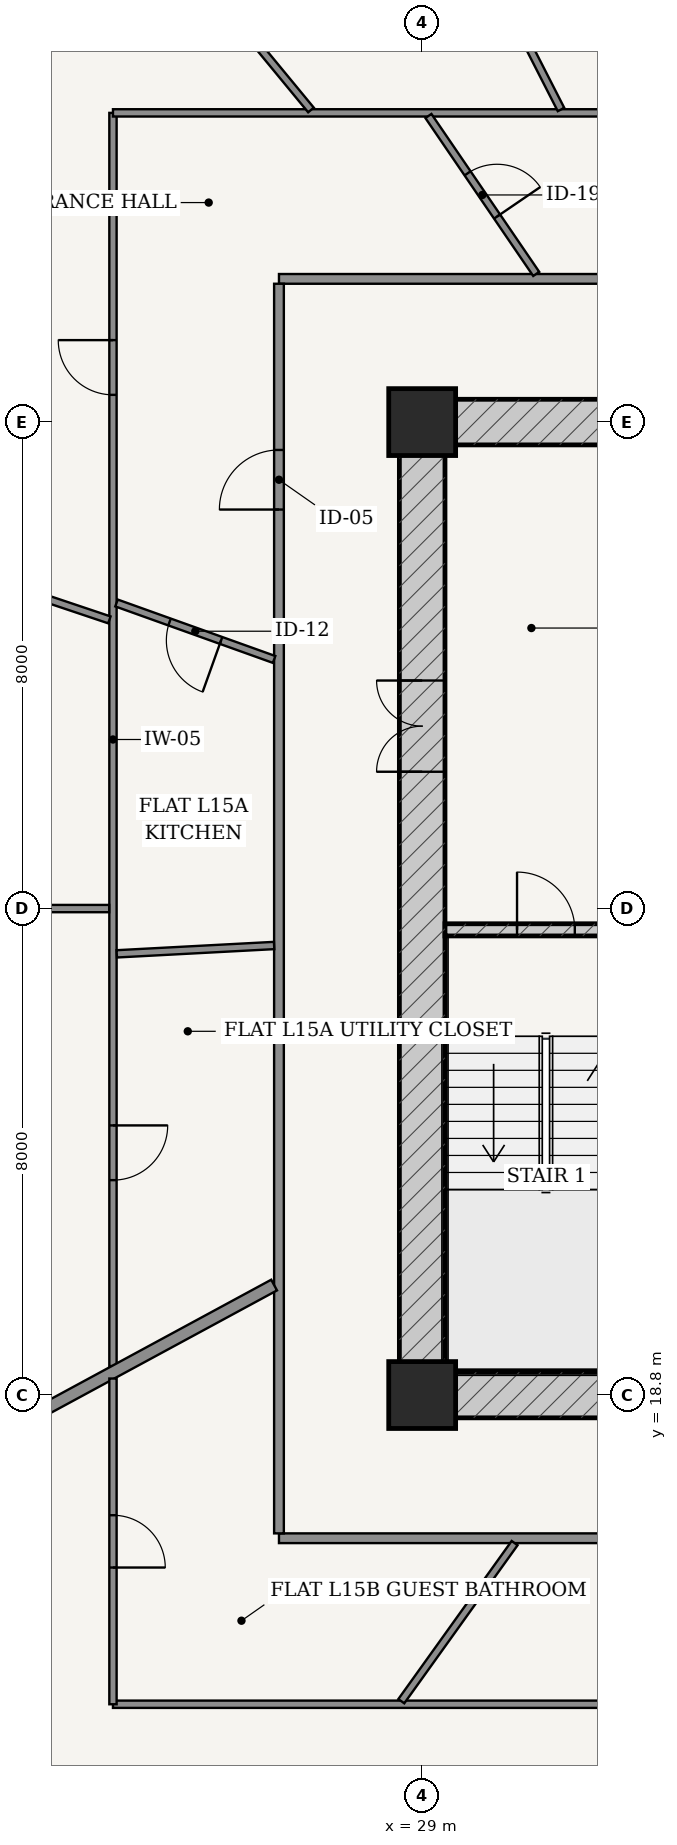
"""IFC4 building model, lengths in metres.
Left out: names, types, materials, properties, quantities, classifications, styles, units other than length and angle.
Written with IfcOpenShell. Run it as: python <this file> out.ifc"""

import sys

from ifc_helpers import new_model, si_unit, direction, frame, frame_2d, origin, origin_2d, place, context, subcontext, project, spatial, rectangle, extrude, source, transform, mapped, element, fill, save


model = new_model("IFC4")
c1 = context("Model", 3, precision=1e-05, world=origin(), true_north=direction((-0.2419218956, 0.970295726276)))
c2 = subcontext(c1, "Body", "Model", "MODEL_VIEW")
j1 = project(units=[si_unit("LENGTHUNIT", "METRE"), si_unit("PLANEANGLEUNIT", "RADIAN")], contexts=[c1])
p1 = place(None, origin())
s1 = spatial("IfcSite", under=j1, at=p1, CompositionType="ELEMENT")
p2 = place(p1, origin())
s2 = spatial("IfcBuilding", under=s1, at=p2, CompositionType="ELEMENT")
p3 = place(p2, frame((0.0, 0.0, 60.0)))
s3 = spatial("IfcBuildingStorey", under=s2, at=p3, CompositionType="ELEMENT", Elevation=60.0)
for number, where, z_axis, x_axis in (
    (1, (29.0, 18.8, 0.0), (0.0, 0.0, 1.0), (1.0, 0.0, 0.0)),
    (2, (29.0, 34.8, 0.0), (0.0, 0.0, 1.0), (1.0, 0.0, 0.0)),
):
    element("IfcColumn", number, at=place(p3, frame(where, z_axis=z_axis, x_axis=x_axis)), inside=s3, PredefinedType="COLUMN", context=c2, shape_type="SweptSolid", body=[
        extrude(rectangle(XDim=1.1, YDim=1.1, at=origin_2d()), origin(), (0.0, 0.0, 1.0), 3.6),
    ])
p4 = place(p3, frame((28.625, 18.8, 0.0), z_axis=(0.0, 0.0, 1.0), x_axis=(1.0, 0.0, 0.0)))
e3 = element("IfcWall", 3, at=p4, inside=s3, PredefinedType="SHEAR", context=c2, shape_type="SweptSolid", body=[
    extrude(rectangle(XDim=18.75, YDim=0.75, at=frame_2d((9.375, 0.0))), origin(), (0.0, 0.0, 1.0), 3.32),
])
p5 = place(p4, frame((8.95, 0.0, 0.0)))
e4 = element("IfcOpeningElement", 4, at=p5, cuts=e3, PredefinedType="OPENING", context=c2, shape_type="SweptSolid", body=[
    extrude(rectangle(XDim=0.85, YDim=2.1, at=frame_2d((0.425, 1.05))), frame((0.0, 0.385, 0.0), z_axis=(0.0, -1.0, 0.0), x_axis=(1.0, 0.0, 0.0)), (0.0, 0.0, 1.0), 0.77),
])
p6 = place(p3, frame((28.625, 34.8, 0.0), z_axis=(0.0, 0.0, 1.0), x_axis=(1.0, 0.0, 0.0)))
e5 = element("IfcWall", 5, at=p6, inside=s3, PredefinedType="SHEAR", context=c2, shape_type="SweptSolid", body=[
    extrude(rectangle(XDim=18.75, YDim=0.75, at=frame_2d((9.375, 0.0))), origin(), (0.0, 0.0, 1.0), 3.32),
])
p7 = place(p6, frame((8.95, 0.0, 0.0)))
e6 = element("IfcOpeningElement", 6, at=p7, cuts=e5, PredefinedType="OPENING", context=c2, shape_type="SweptSolid", body=[
    extrude(rectangle(XDim=0.85, YDim=2.1, at=frame_2d((0.425, 1.05))), frame((0.0, 0.385, 0.0), z_axis=(0.0, -1.0, 0.0), x_axis=(1.0, 0.0, 0.0)), (0.0, 0.0, 1.0), 0.77),
])
p8 = place(p3, frame((29.0, 19.175, 0.0), z_axis=(0.0, 0.0, 1.0), x_axis=(0.0, 1.0, 0.0)))
e7 = element("IfcWall", 7, at=p8, inside=s3, PredefinedType="SHEAR", context=c2, shape_type="SweptSolid", body=[
    extrude(rectangle(XDim=15.25, YDim=0.75, at=frame_2d((7.625, 0.0))), origin(), (0.0, 0.0, 1.0), 3.32),
])
p9 = place(p8, frame((9.875, 0.0, 0.0)))
e8 = element("IfcOpeningElement", 8, at=p9, cuts=e7, PredefinedType="OPENING", context=c2, shape_type="SweptSolid", body=[
    extrude(rectangle(XDim=1.5, YDim=2.2, at=frame_2d((0.75, 1.1))), frame((0.0, 0.385, 0.0), z_axis=(0.0, -1.0, 0.0), x_axis=(1.0, 0.0, 0.0)), (0.0, 0.0, 1.0), 0.77),
])
p10 = place(p3, frame((29.375, 26.45, 0.0), z_axis=(0.0, 0.0, 1.0), x_axis=(1.0, 0.0, 0.0)))
e9 = element("IfcWall", 9, at=p10, inside=s3, PredefinedType="SOLIDWALL", context=c2, shape_type="SweptSolid", body=[
    extrude(rectangle(XDim=3.32, YDim=0.2, at=frame_2d((1.66, 0.0))), origin(), (0.0, 0.0, 1.0), 3.32),
])
p11 = place(p10, frame((1.185, 0.0, 0.0)))
e10 = element("IfcOpeningElement", 10, at=p11, cuts=e9, PredefinedType="OPENING", context=c2, shape_type="SweptSolid", body=[
    extrude(rectangle(XDim=0.95, YDim=2.15, at=frame_2d((0.475, 1.075))), frame((0.0, 0.11, 0.0), z_axis=(0.0, -1.0, 0.0), x_axis=(1.0, 0.0, 0.0)), (0.0, 0.0, 1.0), 0.22),
])
for number, where, z_axis, x_axis in (
    (11, (26.645, 16.445, 0.0), (0.0, 0.0, 1.0), (1.0, 0.0, 0.0)),
    (12, (26.645, 37.155, 0.0), (0.0, 0.0, 1.0), (1.0, 0.0, 0.0)),
):
    element("IfcWall", number, at=place(p3, frame(where, z_axis=z_axis, x_axis=x_axis)), inside=s3, PredefinedType="PARTITIONING", context=c2, shape_type="SweptSolid", body=[
        extrude(rectangle(XDim=22.71, YDim=0.16, at=frame_2d((11.355, 0.0))), origin(), (0.0, 0.0, 1.0), 2.688),
    ])
p12 = place(p3, frame((26.645, 16.525, 0.0), z_axis=(0.0, 0.0, 1.0), x_axis=(0.0, 1.0, 0.0)))
e13 = element("IfcWall", 13, at=p12, inside=s3, PredefinedType="PARTITIONING", context=c2, shape_type="SweptSolid", body=[
    extrude(rectangle(XDim=20.55, YDim=0.16, at=frame_2d((10.275, 0.0))), origin(), (0.0, 0.0, 1.0), 2.688),
])
p13 = place(p12, frame((16.837, 0.0, 0.0)))
e14 = element("IfcOpeningElement", 14, at=p13, cuts=e13, PredefinedType="OPENING", context=c2, shape_type="SweptSolid", body=[
    extrude(rectangle(XDim=0.98, YDim=2.2, at=frame_2d((0.49, 1.1))), frame((0.0, 0.09, 0.0), z_axis=(0.0, -1.0, 0.0), x_axis=(1.0, 0.0, 0.0)), (0.0, 0.0, 1.0), 0.18),
])
p14 = place(p3, frame((23.915, 19.276, 0.0), z_axis=(0.0, 0.0, 1.0), x_axis=(0.0, 1.0, 0.0)))
e15 = element("IfcWall", 15, at=p14, inside=s3, PredefinedType="PARTITIONING", context=c2, shape_type="SweptSolid", body=[
    extrude(rectangle(XDim=20.609, YDim=0.12, at=frame_2d((10.305, 0.0))), origin(), (0.0, 0.0, 1.0), 2.688),
])
p15 = place(p14, frame((15.972, 0.0, 0.0)))
e16 = element("IfcOpeningElement", 16, at=p15, cuts=e15, PredefinedType="OPENING", context=c2, shape_type="SweptSolid", body=[
    extrude(rectangle(XDim=0.9, YDim=2.15, at=frame_2d((0.45, 1.075))), frame((0.0, 0.07, 0.0), z_axis=(0.0, -1.0, 0.0), x_axis=(1.0, 0.0, 0.0)), (0.0, 0.0, 1.0), 0.14),
])
p16 = place(p14, frame((3.058, 0.0, 0.0)))
e17 = element("IfcOpeningElement", 17, at=p16, cuts=e15, PredefinedType="OPENING", context=c2, shape_type="SweptSolid", body=[
    extrude(rectangle(XDim=0.9, YDim=2.15, at=frame_2d((0.45, 1.075))), frame((0.0, 0.07, 0.0), z_axis=(0.0, -1.0, 0.0), x_axis=(1.0, 0.0, 0.0)), (0.0, 0.0, 1.0), 0.14),
])
p17 = place(p3, frame((23.915, 39.885, 0.0), z_axis=(0.0, 0.0, 1.0), x_axis=(1.0, 0.0, 0.0)))
e18 = element("IfcWall", 18, at=p17, inside=s3, PredefinedType="PARTITIONING", context=c2, shape_type="SweptSolid", body=[
    extrude(rectangle(XDim=28.17, YDim=0.12, at=frame_2d((14.085, 0.0))), origin(), (0.0, 0.0, 1.0), 2.688),
])
p18 = place(p17, frame((12.891, 0.0, 0.0)))
e19 = element("IfcOpeningElement", 19, at=p18, cuts=e18, PredefinedType="OPENING", context=c2, shape_type="SweptSolid", body=[
    extrude(rectangle(XDim=0.9, YDim=2.15, at=frame_2d((0.45, 1.075))), frame((0.0, 0.07, 0.0), z_axis=(0.0, -1.0, 0.0), x_axis=(1.0, 0.0, 0.0)), (0.0, 0.0, 1.0), 0.14),
])
p19 = place(p3, frame((31.283, 39.94, 0.0), z_axis=(0.0, 0.0, 1.0), x_axis=(-0.455131303234, 0.890424335256, 0.0)))
e20 = element("IfcWall", 20, at=p19, inside=s3, PredefinedType="PARTITIONING", context=c2, shape_type="SweptSolid", body=[
    extrude(rectangle(XDim=9.562, YDim=0.12, at=frame_2d((4.781, 0.0))), origin(), (0.0, 0.0, 1.0), 2.762),
])
p20 = place(p19, frame((4.331, 0.0, 0.0)))
e21 = element("IfcOpeningElement", 21, at=p20, cuts=e20, PredefinedType="OPENING", context=c2, shape_type="SweptSolid", body=[
    extrude(rectangle(XDim=0.9, YDim=2.15, at=frame_2d((0.45, 1.075))), frame((0.0, 0.07, 0.0), z_axis=(0.0, -1.0, 0.0), x_axis=(1.0, 0.0, 0.0)), (0.0, 0.0, 1.0), 0.14),
])
p21 = place(p3, frame((27.171, 39.933, 0.0), z_axis=(0.0, 0.0, 1.0), x_axis=(-0.636192172227, 0.771530634516, 0.0)))
e22 = element("IfcWall", 22, at=p21, inside=s3, PredefinedType="PARTITIONING", context=c2, shape_type="SweptSolid", body=[
    extrude(rectangle(XDim=8.186, YDim=0.12, at=frame_2d((4.093, 0.0))), origin(), (0.0, 0.0, 1.0), 2.688),
])
p22 = place(p21, frame((2.584, 0.0, 0.0)))
e23 = element("IfcOpeningElement", 23, at=p22, cuts=e22, PredefinedType="OPENING", context=c2, shape_type="SweptSolid", body=[
    extrude(rectangle(XDim=0.9, YDim=2.15, at=frame_2d((0.45, 1.075))), frame((0.0, 0.07, 0.0), z_axis=(0.0, -1.0, 0.0), x_axis=(1.0, 0.0, 0.0)), (0.0, 0.0, 1.0), 0.14),
])
p23 = place(p3, frame((23.856, 31.547, 0.0), z_axis=(0.0, 0.0, 1.0), x_axis=(-0.948017487737, 0.318218231634, 0.0)))
e24 = element("IfcWall", 24, at=p23, inside=s3, PredefinedType="PARTITIONING", context=c2, shape_type="SweptSolid", body=[
    extrude(rectangle(XDim=13.279, YDim=0.12, at=frame_2d((6.639, 0.0))), origin(), (0.0, 0.0, 1.0), 2.762),
])
p24 = place(p23, frame((6.189, 0.0, 0.0)))
e25 = element("IfcOpeningElement", 25, at=p24, cuts=e24, PredefinedType="OPENING", context=c2, shape_type="SweptSolid", body=[
    extrude(rectangle(XDim=0.9, YDim=2.15, at=frame_2d((0.45, 1.075))), frame((0.0, 0.07, 0.0), z_axis=(0.0, -1.0, 0.0), x_axis=(1.0, 0.0, 0.0)), (0.0, 0.0, 1.0), 0.14),
])
p25 = place(p3, frame((23.853, 26.8, 0.0), z_axis=(0.0, 0.0, 1.0), x_axis=(-1.0, 0.0, 0.0)))
e26 = element("IfcWall", 26, at=p25, inside=s3, PredefinedType="PARTITIONING", context=c2, shape_type="SweptSolid", body=[
    extrude(rectangle(XDim=14.793, YDim=0.12, at=frame_2d((7.396, 0.0))), origin(), (0.0, 0.0, 1.0), 2.762),
])
p26 = place(p25, frame((6.947, 0.0, 0.0)))
e27 = element("IfcOpeningElement", 27, at=p26, cuts=e26, PredefinedType="OPENING", context=c2, shape_type="SweptSolid", body=[
    extrude(rectangle(XDim=0.9, YDim=2.15, at=frame_2d((0.45, 1.075))), frame((0.0, 0.07, 0.0), z_axis=(0.0, -1.0, 0.0), x_axis=(1.0, 0.0, 0.0)), (0.0, 0.0, 1.0), 0.14),
])
p27 = place(p3, frame((30.875, 37.237, 0.0), z_axis=(0.0, 0.0, 1.0), x_axis=(-0.563751131022, 0.825944708967, 0.0)))
e28 = element("IfcWall", 28, at=p27, inside=s3, PredefinedType="PARTITIONING", context=c2, shape_type="SweptSolid", body=[
    extrude(rectangle(XDim=3.145, YDim=0.12, at=frame_2d((1.572, 0.0))), origin(), (0.0, 0.0, 1.0), 3.32),
])
p28 = place(p27, frame((1.142, 0.0, 0.0)))
e29 = element("IfcOpeningElement", 29, at=p28, cuts=e28, PredefinedType="OPENING", context=c2, shape_type="SweptSolid", body=[
    extrude(rectangle(XDim=0.86, YDim=2.15, at=frame_2d((0.43, 1.075))), frame((0.0, 0.07, 0.0), z_axis=(0.0, -1.0, 0.0), x_axis=(1.0, 0.0, 0.0)), (0.0, 0.0, 1.0), 0.14),
])
p29 = place(p3, frame((26.565, 30.896, 0.0), z_axis=(0.0, 0.0, 1.0), x_axis=(-0.941406362049, 0.337274460186, 0.0)))
e30 = element("IfcWall", 30, at=p29, inside=s3, PredefinedType="PARTITIONING", context=c2, shape_type="SweptSolid", body=[
    extrude(rectangle(XDim=2.753, YDim=0.12, at=frame_2d((1.376, 0.0))), origin(), (0.0, 0.0, 1.0), 3.32),
])
p30 = place(p29, frame((0.927, 0.0, 0.0)))
e31 = element("IfcOpeningElement", 31, at=p30, cuts=e30, PredefinedType="OPENING", context=c2, shape_type="SweptSolid", body=[
    extrude(rectangle(XDim=0.9, YDim=2.15, at=frame_2d((0.45, 1.075))), frame((0.0, 0.07, 0.0), z_axis=(0.0, -1.0, 0.0), x_axis=(1.0, 0.0, 0.0)), (0.0, 0.0, 1.0), 0.14),
])
p31 = place(p3, frame((26.565, 26.193, 0.0), z_axis=(0.0, 0.0, 1.0), x_axis=(-0.99859273586, -0.053033460078, 0.0)))
e32 = element("IfcWall", 32, at=p31, inside=s3, PredefinedType="PARTITIONING", context=c2, shape_type="SweptSolid", body=[
    extrude(rectangle(XDim=2.592, YDim=0.12, at=frame_2d((1.296, 0.0))), origin(), (0.0, 0.0, 1.0), 3.32),
])
p32 = place(p3, frame((26.565, 20.608, 0.0), z_axis=(0.0, 0.0, 1.0), x_axis=(-0.879369737803, -0.476139542819, 0.0)))
e33 = element("IfcWall", 33, at=p32, inside=s3, PredefinedType="PARTITIONING", context=c2, shape_type="SweptSolid", body=[
    extrude(rectangle(XDim=14.295, YDim=0.2, at=frame_2d((7.147, 0.0))), origin(), (0.0, 0.0, 1.0), 2.688),
])
p33 = place(p3, frame((52.085, 13.715, 0.0), z_axis=(0.0, 0.0, 1.0), x_axis=(-1.0, 0.0, 0.0)))
e34 = element("IfcWall", 34, at=p33, inside=s3, PredefinedType="PARTITIONING", context=c2, shape_type="SweptSolid", body=[
    extrude(rectangle(XDim=28.17, YDim=0.12, at=frame_2d((14.085, 0.0))), origin(), (0.0, 0.0, 1.0), 2.688),
])
p34 = place(p33, frame((12.891, 0.0, 0.0)))
e35 = element("IfcOpeningElement", 35, at=p34, cuts=e34, PredefinedType="OPENING", context=c2, shape_type="SweptSolid", body=[
    extrude(rectangle(XDim=0.9, YDim=2.15, at=frame_2d((0.45, 1.075))), frame((0.0, 0.07, 0.0), z_axis=(0.0, -1.0, 0.0), x_axis=(1.0, 0.0, 0.0)), (0.0, 0.0, 1.0), 0.14),
])
p35 = place(p3, frame((23.915, 13.715, 0.0), z_axis=(0.0, 0.0, 1.0), x_axis=(0.0, 1.0, 0.0)))
e36 = element("IfcWall", 36, at=p35, inside=s3, PredefinedType="PARTITIONING", context=c2, shape_type="SweptSolid", body=[
    extrude(rectangle(XDim=5.356, YDim=0.12, at=frame_2d((2.678, 0.0))), origin(), (0.0, 0.0, 1.0), 2.999),
])
p36 = place(p35, frame((2.248, 0.0, 0.0)))
e37 = element("IfcOpeningElement", 37, at=p36, cuts=e36, PredefinedType="OPENING", context=c2, shape_type="SweptSolid", body=[
    extrude(rectangle(XDim=0.86, YDim=2.15, at=frame_2d((0.43, 1.075))), frame((0.0, 0.07, 0.0), z_axis=(0.0, -1.0, 0.0), x_axis=(1.0, 0.0, 0.0)), (0.0, 0.0, 1.0), 0.14),
])
p37 = place(p3, frame((30.52, 16.365, 0.0), z_axis=(0.0, 0.0, 1.0), x_axis=(-0.582566008831, -0.812783393872, 0.0)))
e38 = element("IfcWall", 38, at=p37, inside=s3, PredefinedType="PARTITIONING", context=c2, shape_type="SweptSolid", body=[
    extrude(rectangle(XDim=3.198, YDim=0.12, at=frame_2d((1.599, 0.0))), origin(), (0.0, 0.0, 1.0), 3.32),
])
m1 = source(origin(), c2, "Body", "SweptSolid", [
    extrude(rectangle(XDim=1.5, YDim=2.2, at=frame_2d((0.75, 1.1))), frame((0.0, 0.025, 0.0), z_axis=(0.0, -1.0, 0.0), x_axis=(1.0, 0.0, 0.0)), (0.0, 0.0, 1.0), 0.05),
])
p38 = place(p9, origin())
e39 = element("IfcDoor", 39, at=p38, inside=s3, OperationType="DOUBLE_DOOR_SINGLE_SWING", PredefinedType="DOOR", context=c2, shape_type="MappedRepresentation", body=[
    mapped(m1, transform((0.0, 0.0, 0.0), scale=1.0)),
])
fill(e8, e39)
m2 = source(origin(), c2, "Body", "SweptSolid", [
    extrude(rectangle(XDim=0.95, YDim=2.15, at=frame_2d((0.475, 1.075))), frame((0.0, 0.025, 0.0), z_axis=(0.0, -1.0, 0.0), x_axis=(1.0, 0.0, 0.0)), (0.0, 0.0, 1.0), 0.05),
])
p39 = place(p11, origin())
e40 = element("IfcDoor", 40, at=p39, inside=s3, OperationType="SINGLE_SWING_LEFT", PredefinedType="DOOR", context=c2, shape_type="MappedRepresentation", body=[
    mapped(m2, transform((0.0, 0.0, 0.0), scale=1.0)),
])
fill(e10, e40)
m3 = source(origin(), c2, "Body", "SweptSolid", [
    extrude(rectangle(XDim=0.98, YDim=2.2, at=frame_2d((0.49, 1.1))), frame((0.0, 0.025, 0.0), z_axis=(0.0, -1.0, 0.0), x_axis=(1.0, 0.0, 0.0)), (0.0, 0.0, 1.0), 0.05),
])
p40 = place(p13, origin())
e41 = element("IfcDoor", 41, at=p40, inside=s3, OperationType="SINGLE_SWING_LEFT", PredefinedType="DOOR", context=c2, shape_type="MappedRepresentation", body=[
    mapped(m3, transform((0.0, 0.0, 0.0), scale=1.0)),
])
fill(e14, e41)
m4 = source(origin(), c2, "Body", "SweptSolid", [
    extrude(rectangle(XDim=0.86, YDim=2.15, at=frame_2d((0.43, 1.075))), frame((0.0, 0.025, 0.0), z_axis=(0.0, -1.0, 0.0), x_axis=(1.0, 0.0, 0.0)), (0.0, 0.0, 1.0), 0.05),
])
p41 = place(p28, frame((0.86, 0.0, 0.0), z_axis=(0.0, 0.0, 1.0), x_axis=(-1.0, 0.0, 0.0)))
e42 = element("IfcDoor", 42, at=p41, inside=s3, OperationType="SINGLE_SWING_RIGHT", PredefinedType="DOOR", context=c2, shape_type="MappedRepresentation", body=[
    mapped(m4, transform((0.0, 0.0, 0.0), scale=1.0)),
])
fill(e29, e42)
m5 = source(origin(), c2, "Body", "SweptSolid", [
    extrude(rectangle(XDim=0.9, YDim=2.15, at=frame_2d((0.45, 1.075))), frame((0.0, 0.025, 0.0), z_axis=(0.0, -1.0, 0.0), x_axis=(1.0, 0.0, 0.0)), (0.0, 0.0, 1.0), 0.05),
])
p42 = place(p30, origin())
e43 = element("IfcDoor", 43, at=p42, inside=s3, OperationType="SINGLE_SWING_LEFT", PredefinedType="DOOR", context=c2, shape_type="MappedRepresentation", body=[
    mapped(m5, transform((0.0, 0.0, 0.0), scale=1.0)),
])
fill(e31, e43)
p43 = place(p15, origin())
e44 = element("IfcDoor", 44, at=p43, inside=s3, OperationType="SINGLE_SWING_RIGHT", PredefinedType="DOOR", context=c2, shape_type="MappedRepresentation", body=[
    mapped(m5, transform((0.0, 0.0, 0.0), scale=1.0)),
])
fill(e16, e44)
p44 = place(p16, frame((0.9, 0.0, 0.0), z_axis=(0.0, 0.0, 1.0), x_axis=(-1.0, 0.0, 0.0)))
e45 = element("IfcDoor", 45, at=p44, inside=s3, OperationType="SINGLE_SWING_LEFT", PredefinedType="DOOR", context=c2, shape_type="MappedRepresentation", body=[
    mapped(m5, transform((0.0, 0.0, 0.0), scale=1.0)),
])
fill(e17, e45)
p45 = place(p36, frame((0.86, 0.0, 0.0), z_axis=(0.0, 0.0, 1.0), x_axis=(-1.0, 0.0, 0.0)))
e46 = element("IfcDoor", 46, at=p45, inside=s3, OperationType="SINGLE_SWING_RIGHT", PredefinedType="DOOR", context=c2, shape_type="MappedRepresentation", body=[
    mapped(m4, transform((0.0, 0.0, 0.0), scale=1.0)),
])
fill(e37, e46)
save(model, sys.argv[1])
